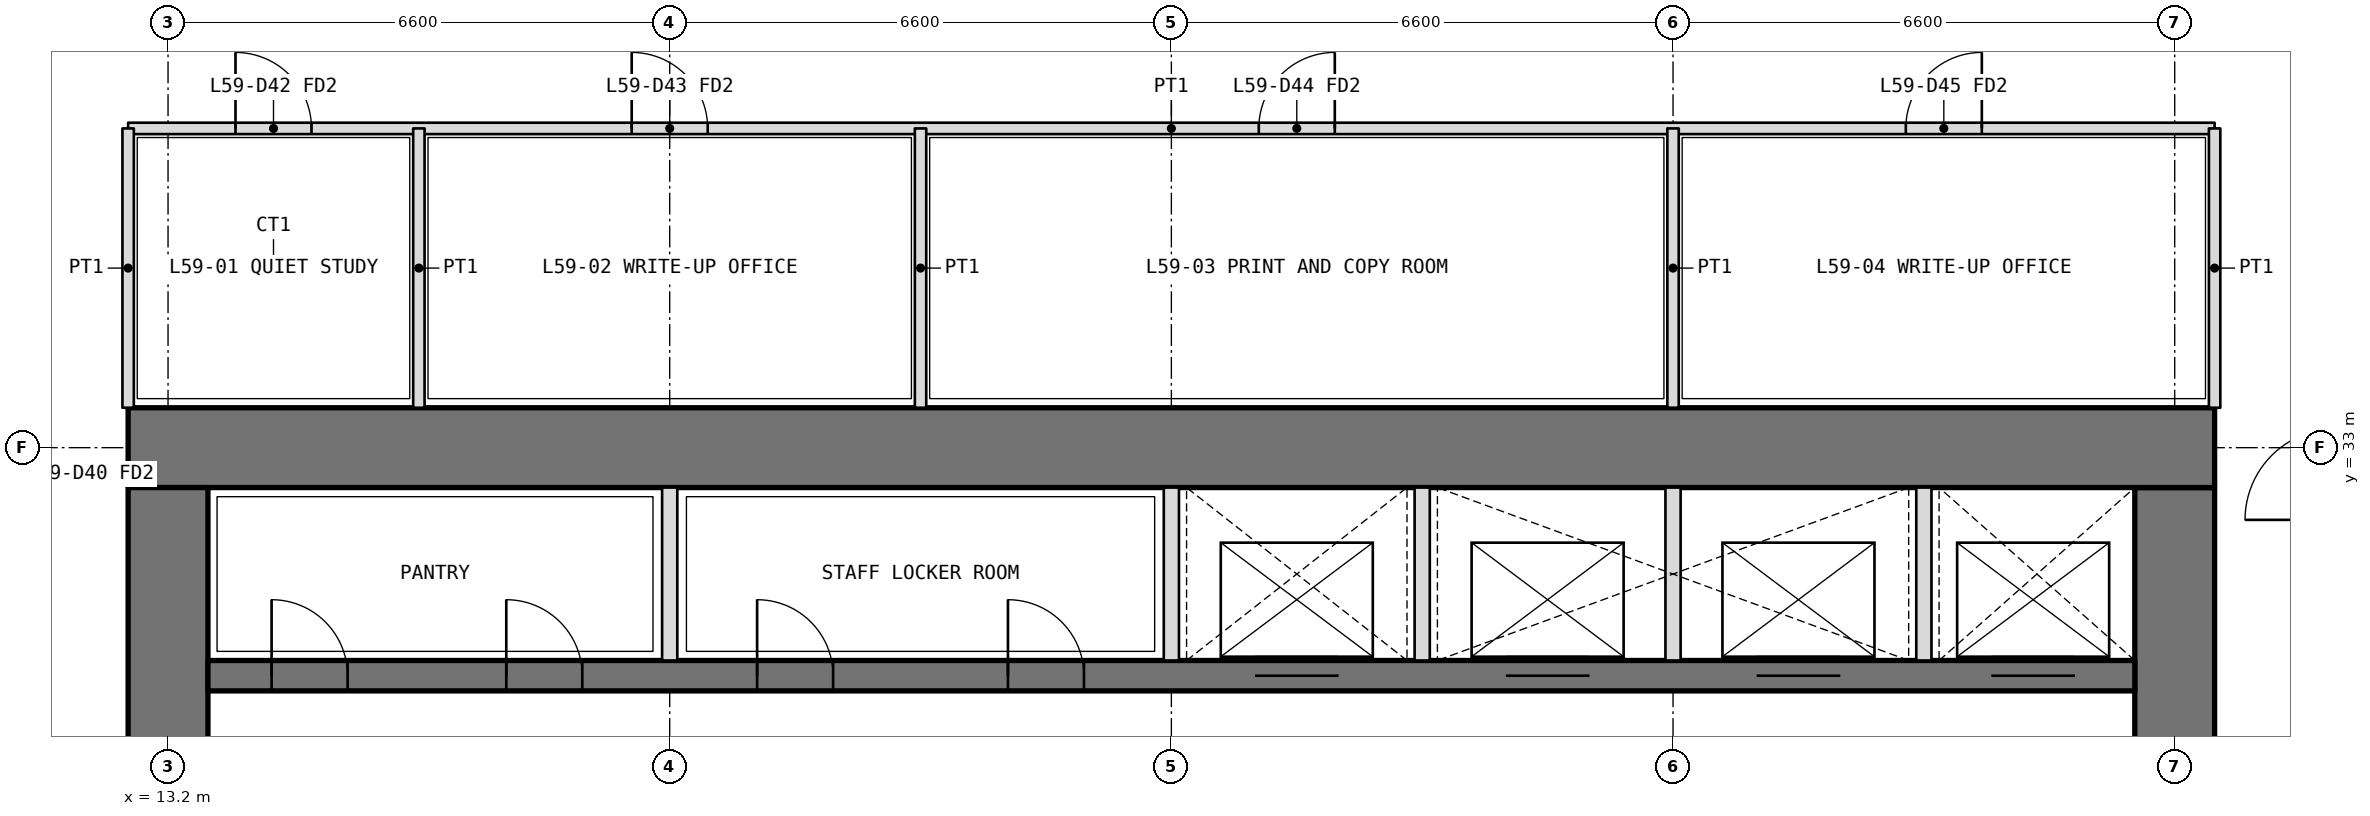
"""IFC4 building model, lengths in metres.
Left out: names, types, materials, properties, quantities, classifications, styles, units other than length and angle.
Written with IfcOpenShell. Run it as: python <this file> out.ifc"""

import sys

from ifc_helpers import new_model, si_unit, direction, frame, frame_2d, origin, place, context, subcontext, project, spatial, rectangle, extrude, element, fill, save


model = new_model("IFC4")
c1 = context("Model", 3, precision=1e-05, world=origin(), true_north=direction((0.0, 1.0)))
c2 = subcontext(c1, "Body", "Model", "MODEL_VIEW")
j1 = project(units=[si_unit("LENGTHUNIT", "METRE"), si_unit("PLANEANGLEUNIT", "RADIAN")], contexts=[c1])
p1 = place(None, origin())
s1 = spatial("IfcSite", under=j1, at=p1, CompositionType="ELEMENT")
p2 = place(p1, origin())
s2 = spatial("IfcBuilding", under=s1, at=p2, CompositionType="ELEMENT")
p3 = place(p2, frame((0.0, 0.0, 258.6)))
s3 = spatial("IfcBuildingStorey", under=s2, at=p3, CompositionType="ELEMENT", Elevation=258.6)
p4 = place(p3, frame((39.6, 13.725, 0.0), z_axis=(0.0, 0.0, 1.0), x_axis=(0.0, 1.0, 0.0)))
e1 = element("IfcWall", 1, at=p4, inside=s3, PredefinedType="SHEAR", context=c2, shape_type="SweptSolid", body=[
    extrude(rectangle(XDim=18.75, YDim=1.05, at=frame_2d((9.375, 0.0))), origin(), (0.0, 0.0, 1.0), 4.2),
])
p5 = place(p4, frame((3.025, 0.0, 0.0)))
e2 = element("IfcOpeningElement", 2, at=p5, cuts=e1, PredefinedType="OPENING", context=c2, shape_type="SweptSolid", body=[
    extrude(rectangle(XDim=1.6, YDim=2.1, at=frame_2d((0.8, 1.05))), frame((0.0, 0.535, 0.0), z_axis=(0.0, -1.0, 0.0), x_axis=(1.0, 0.0, 0.0)), (0.0, 0.0, 1.0), 1.07),
])
p6 = place(p4, frame((13.825, 0.0, 0.0)))
e3 = element("IfcOpeningElement", 3, at=p6, cuts=e1, PredefinedType="OPENING", context=c2, shape_type="SweptSolid", body=[
    extrude(rectangle(XDim=1.6, YDim=2.1, at=frame_2d((0.8, 1.05))), frame((0.0, 0.535, 0.0), z_axis=(0.0, -1.0, 0.0), x_axis=(1.0, 0.0, 0.0)), (0.0, 0.0, 1.0), 1.07),
])
p7 = place(p3, frame((40.125, 33.0, 0.0), z_axis=(0.0, 0.0, 1.0), x_axis=(-1.0, 0.0, 0.0)))
e4 = element("IfcWall", 4, at=p7, inside=s3, PredefinedType="SHEAR", context=c2, shape_type="SweptSolid", body=[
    extrude(rectangle(XDim=27.45, YDim=1.05, at=frame_2d((13.725, 0.0))), origin(), (0.0, 0.0, 1.0), 4.2),
])
p8 = place(p3, frame((13.2, 32.475, 0.0), z_axis=(0.0, 0.0, 1.0), x_axis=(0.0, -1.0, 0.0)))
e5 = element("IfcWall", 5, at=p8, inside=s3, PredefinedType="SHEAR", context=c2, shape_type="SweptSolid", body=[
    extrude(rectangle(XDim=18.75, YDim=1.05, at=frame_2d((9.375, 0.0))), origin(), (0.0, 0.0, 1.0), 4.2),
])
p9 = place(p8, frame((14.125, 0.0, 0.0)))
e6 = element("IfcOpeningElement", 6, at=p9, cuts=e5, PredefinedType="OPENING", context=c2, shape_type="SweptSolid", body=[
    extrude(rectangle(XDim=1.6, YDim=2.1, at=frame_2d((0.8, 1.05))), frame((0.0, 0.535, 0.0), z_axis=(0.0, -1.0, 0.0), x_axis=(1.0, 0.0, 0.0)), (0.0, 0.0, 1.0), 1.07),
])
p10 = place(p8, frame((3.325, 0.0, 0.0)))
e7 = element("IfcOpeningElement", 7, at=p10, cuts=e5, PredefinedType="OPENING", context=c2, shape_type="SweptSolid", body=[
    extrude(rectangle(XDim=1.6, YDim=2.1, at=frame_2d((0.8, 1.05))), frame((0.0, 0.535, 0.0), z_axis=(0.0, -1.0, 0.0), x_axis=(1.0, 0.0, 0.0)), (0.0, 0.0, 1.0), 1.07),
])
p11 = place(p3, frame((13.725, 30.0, 0.0), z_axis=(0.0, 0.0, 1.0), x_axis=(1.0, 0.0, 0.0)))
e8 = element("IfcWall", 8, at=p11, inside=s3, PredefinedType="SHEAR", context=c2, shape_type="SweptSolid", body=[
    extrude(rectangle(XDim=25.35, YDim=0.4, at=frame_2d((12.675, 0.0))), origin(), (0.0, 0.0, 1.0), 4.2),
])
p12 = place(p11, frame((0.837, 0.0, 0.0)))
e9 = element("IfcOpeningElement", 9, at=p12, cuts=e8, PredefinedType="OPENING", context=c2, shape_type="SweptSolid", body=[
    extrude(rectangle(XDim=1.0, YDim=2.1, at=frame_2d((0.5, 1.05))), frame((0.0, 0.21, 0.0), z_axis=(0.0, -1.0, 0.0), x_axis=(1.0, 0.0, 0.0)), (0.0, 0.0, 1.0), 0.42),
])
p13 = place(p11, frame((3.925, 0.0, 0.0)))
e10 = element("IfcOpeningElement", 10, at=p13, cuts=e8, PredefinedType="OPENING", context=c2, shape_type="SweptSolid", body=[
    extrude(rectangle(XDim=1.0, YDim=2.1, at=frame_2d((0.5, 1.05))), frame((0.0, 0.21, 0.0), z_axis=(0.0, -1.0, 0.0), x_axis=(1.0, 0.0, 0.0)), (0.0, 0.0, 1.0), 0.42),
])
p14 = place(p11, frame((7.225, 0.0, 0.0)))
e11 = element("IfcOpeningElement", 11, at=p14, cuts=e8, PredefinedType="OPENING", context=c2, shape_type="SweptSolid", body=[
    extrude(rectangle(XDim=1.0, YDim=2.1, at=frame_2d((0.5, 1.05))), frame((0.0, 0.21, 0.0), z_axis=(0.0, -1.0, 0.0), x_axis=(1.0, 0.0, 0.0)), (0.0, 0.0, 1.0), 0.42),
])
p15 = place(p11, frame((10.525, 0.0, 0.0)))
e12 = element("IfcOpeningElement", 12, at=p15, cuts=e8, PredefinedType="OPENING", context=c2, shape_type="SweptSolid", body=[
    extrude(rectangle(XDim=1.0, YDim=2.1, at=frame_2d((0.5, 1.05))), frame((0.0, 0.21, 0.0), z_axis=(0.0, -1.0, 0.0), x_axis=(1.0, 0.0, 0.0)), (0.0, 0.0, 1.0), 0.42),
])
p16 = place(p11, frame((13.775, 0.0, 0.0)))
e13 = element("IfcOpeningElement", 13, at=p16, cuts=e8, PredefinedType="OPENING", context=c2, shape_type="SweptSolid", body=[
    extrude(rectangle(XDim=1.1, YDim=2.1, at=frame_2d((0.55, 1.05))), frame((0.0, 0.21, 0.0), z_axis=(0.0, -1.0, 0.0), x_axis=(1.0, 0.0, 0.0)), (0.0, 0.0, 1.0), 0.42),
])
p17 = place(p11, frame((17.075, 0.0, 0.0)))
e14 = element("IfcOpeningElement", 14, at=p17, cuts=e8, PredefinedType="OPENING", context=c2, shape_type="SweptSolid", body=[
    extrude(rectangle(XDim=1.1, YDim=2.1, at=frame_2d((0.55, 1.05))), frame((0.0, 0.21, 0.0), z_axis=(0.0, -1.0, 0.0), x_axis=(1.0, 0.0, 0.0)), (0.0, 0.0, 1.0), 0.42),
])
p18 = place(p11, frame((20.375, 0.0, 0.0)))
e15 = element("IfcOpeningElement", 15, at=p18, cuts=e8, PredefinedType="OPENING", context=c2, shape_type="SweptSolid", body=[
    extrude(rectangle(XDim=1.1, YDim=2.1, at=frame_2d((0.55, 1.05))), frame((0.0, 0.21, 0.0), z_axis=(0.0, -1.0, 0.0), x_axis=(1.0, 0.0, 0.0)), (0.0, 0.0, 1.0), 0.42),
])
p19 = place(p11, frame((23.462, 0.0, 0.0)))
e16 = element("IfcOpeningElement", 16, at=p19, cuts=e8, PredefinedType="OPENING", context=c2, shape_type="SweptSolid", body=[
    extrude(rectangle(XDim=1.1, YDim=2.1, at=frame_2d((0.55, 1.05))), frame((0.0, 0.21, 0.0), z_axis=(0.0, -1.0, 0.0), x_axis=(1.0, 0.0, 0.0)), (0.0, 0.0, 1.0), 0.42),
])
for number, where, z_axis, x_axis in (
    (17, (19.8, 30.2, 0.0), (0.0, 0.0, 1.0), (0.0, 1.0, 0.0)),
    (18, (26.4, 30.2, 0.0), (0.0, 0.0, 1.0), (0.0, 1.0, 0.0)),
    (19, (29.7, 30.2, 0.0), (0.0, 0.0, 1.0), (0.0, 1.0, 0.0)),
    (20, (33.0, 30.2, 0.0), (0.0, 0.0, 1.0), (0.0, 1.0, 0.0)),
    (21, (36.3, 30.2, 0.0), (0.0, 0.0, 1.0), (0.0, 1.0, 0.0)),
):
    element("IfcWall", number, at=place(p3, frame(where, z_axis=z_axis, x_axis=x_axis)), inside=s3, PredefinedType="PARTITIONING", context=c2, shape_type="SweptSolid", body=[
        extrude(rectangle(XDim=2.275, YDim=0.2, at=frame_2d((1.138, 0.0))), origin(), (0.0, 0.0, 1.0), 4.2),
    ])
p20 = place(p3, frame((12.675, 37.2, 0.0), z_axis=(0.0, 0.0, 1.0), x_axis=(1.0, 0.0, 0.0)))
e22 = element("IfcWall", 22, at=p20, inside=s3, PredefinedType="PARTITIONING", context=c2, shape_type="SweptSolid", body=[
    extrude(rectangle(XDim=27.45, YDim=0.15, at=frame_2d((13.725, 0.0))), origin(), (0.0, 0.0, 1.0), 3.0),
])
p21 = place(p20, frame((1.413, 0.0, 0.0)))
e23 = element("IfcOpeningElement", 23, at=p21, cuts=e22, PredefinedType="OPENING", context=c2, shape_type="SweptSolid", body=[
    extrude(rectangle(XDim=1.0, YDim=2.1, at=frame_2d((0.5, 1.05))), frame((0.0, 0.085, 0.0), z_axis=(0.0, -1.0, 0.0), x_axis=(1.0, 0.0, 0.0)), (0.0, 0.0, 1.0), 0.17),
])
p22 = place(p20, frame((6.625, 0.0, 0.0)))
e24 = element("IfcOpeningElement", 24, at=p22, cuts=e22, PredefinedType="OPENING", context=c2, shape_type="SweptSolid", body=[
    extrude(rectangle(XDim=1.0, YDim=2.1, at=frame_2d((0.5, 1.05))), frame((0.0, 0.085, 0.0), z_axis=(0.0, -1.0, 0.0), x_axis=(1.0, 0.0, 0.0)), (0.0, 0.0, 1.0), 0.17),
])
p23 = place(p20, frame((14.875, 0.0, 0.0)))
e25 = element("IfcOpeningElement", 25, at=p23, cuts=e22, PredefinedType="OPENING", context=c2, shape_type="SweptSolid", body=[
    extrude(rectangle(XDim=1.0, YDim=2.1, at=frame_2d((0.5, 1.05))), frame((0.0, 0.085, 0.0), z_axis=(0.0, -1.0, 0.0), x_axis=(1.0, 0.0, 0.0)), (0.0, 0.0, 1.0), 0.17),
])
p24 = place(p20, frame((23.387, 0.0, 0.0)))
e26 = element("IfcOpeningElement", 26, at=p24, cuts=e22, PredefinedType="OPENING", context=c2, shape_type="SweptSolid", body=[
    extrude(rectangle(XDim=1.0, YDim=2.1, at=frame_2d((0.5, 1.05))), frame((0.0, 0.085, 0.0), z_axis=(0.0, -1.0, 0.0), x_axis=(1.0, 0.0, 0.0)), (0.0, 0.0, 1.0), 0.17),
])
for number, where, z_axis, x_axis in (
    (27, (12.675, 33.525, 0.0), (0.0, 0.0, 1.0), (0.0, 1.0, 0.0)),
    (28, (40.125, 33.525, 0.0), (0.0, 0.0, 1.0), (0.0, 1.0, 0.0)),
):
    element("IfcWall", number, at=place(p3, frame(where, z_axis=z_axis, x_axis=x_axis)), inside=s3, PredefinedType="PARTITIONING", context=c2, shape_type="SweptSolid", body=[
        extrude(rectangle(XDim=3.675, YDim=0.15, at=frame_2d((1.837, 0.0))), origin(), (0.0, 0.0, 1.0), 3.0),
    ])
for number, where, z_axis, x_axis in (
    (29, (16.5, 33.525, 0.0), (0.0, 0.0, 1.0), (0.0, 1.0, 0.0)),
    (30, (23.1, 33.525, 0.0), (0.0, 0.0, 1.0), (0.0, 1.0, 0.0)),
):
    element("IfcWall", number, at=place(p3, frame(where, z_axis=z_axis, x_axis=x_axis)), inside=s3, PredefinedType="PARTITIONING", context=c2, shape_type="SweptSolid", body=[
        extrude(rectangle(XDim=3.675, YDim=0.15, at=frame_2d((1.837, 0.0))), origin(), (0.0, 0.0, 1.0), 3.9),
    ])
p25 = place(p3, frame((33.0, 33.525, 0.0), z_axis=(0.0, 0.0, 1.0), x_axis=(0.0, 1.0, 0.0)))
e31 = element("IfcWall", 31, at=p25, inside=s3, PredefinedType="PARTITIONING", context=c2, shape_type="SweptSolid", body=[
    extrude(rectangle(XDim=3.675, YDim=0.15, at=frame_2d((1.837, 0.0))), origin(), (0.0, 0.0, 1.0), 3.0),
])
p26 = place(p21, origin())
e32 = element("IfcDoor", 32, at=p26, inside=s3, OperationType="SINGLE_SWING_LEFT", PredefinedType="DOOR", context=c2, shape_type="SweptSolid", body=[
    extrude(rectangle(XDim=1.0, YDim=2.1, at=frame_2d((0.5, 1.05))), frame((0.0, 0.025, 0.0), z_axis=(0.0, -1.0, 0.0), x_axis=(1.0, 0.0, 0.0)), (0.0, 0.0, 1.0), 0.05),
])
fill(e23, e32)
p27 = place(p22, origin())
e33 = element("IfcDoor", 33, at=p27, inside=s3, OperationType="SINGLE_SWING_LEFT", PredefinedType="DOOR", context=c2, shape_type="SweptSolid", body=[
    extrude(rectangle(XDim=1.0, YDim=2.1, at=frame_2d((0.5, 1.05))), frame((0.0, 0.025, 0.0), z_axis=(0.0, -1.0, 0.0), x_axis=(1.0, 0.0, 0.0)), (0.0, 0.0, 1.0), 0.05),
])
fill(e24, e33)
p28 = place(p23, origin())
e34 = element("IfcDoor", 34, at=p28, inside=s3, OperationType="SINGLE_SWING_RIGHT", PredefinedType="DOOR", context=c2, shape_type="SweptSolid", body=[
    extrude(rectangle(XDim=1.0, YDim=2.1, at=frame_2d((0.5, 1.05))), frame((0.0, 0.025, 0.0), z_axis=(0.0, -1.0, 0.0), x_axis=(1.0, 0.0, 0.0)), (0.0, 0.0, 1.0), 0.05),
])
fill(e25, e34)
p29 = place(p24, origin())
e35 = element("IfcDoor", 35, at=p29, inside=s3, OperationType="SINGLE_SWING_RIGHT", PredefinedType="DOOR", context=c2, shape_type="SweptSolid", body=[
    extrude(rectangle(XDim=1.0, YDim=2.1, at=frame_2d((0.5, 1.05))), frame((0.0, 0.025, 0.0), z_axis=(0.0, -1.0, 0.0), x_axis=(1.0, 0.0, 0.0)), (0.0, 0.0, 1.0), 0.05),
])
fill(e26, e35)
p30 = place(p12, origin())
e36 = element("IfcDoor", 36, at=p30, inside=s3, OperationType="SINGLE_SWING_LEFT", PredefinedType="DOOR", context=c2, shape_type="SweptSolid", body=[
    extrude(rectangle(XDim=1.0, YDim=2.1, at=frame_2d((0.5, 1.05))), frame((0.0, 0.025, 0.0), z_axis=(0.0, -1.0, 0.0), x_axis=(1.0, 0.0, 0.0)), (0.0, 0.0, 1.0), 0.05),
])
fill(e9, e36)
p31 = place(p13, origin())
e37 = element("IfcDoor", 37, at=p31, inside=s3, OperationType="SINGLE_SWING_LEFT", PredefinedType="DOOR", context=c2, shape_type="SweptSolid", body=[
    extrude(rectangle(XDim=1.0, YDim=2.1, at=frame_2d((0.5, 1.05))), frame((0.0, 0.025, 0.0), z_axis=(0.0, -1.0, 0.0), x_axis=(1.0, 0.0, 0.0)), (0.0, 0.0, 1.0), 0.05),
])
fill(e10, e37)
p32 = place(p14, origin())
e38 = element("IfcDoor", 38, at=p32, inside=s3, OperationType="SINGLE_SWING_LEFT", PredefinedType="DOOR", context=c2, shape_type="SweptSolid", body=[
    extrude(rectangle(XDim=1.0, YDim=2.1, at=frame_2d((0.5, 1.05))), frame((0.0, 0.025, 0.0), z_axis=(0.0, -1.0, 0.0), x_axis=(1.0, 0.0, 0.0)), (0.0, 0.0, 1.0), 0.05),
])
fill(e11, e38)
p33 = place(p15, origin())
e39 = element("IfcDoor", 39, at=p33, inside=s3, OperationType="SINGLE_SWING_LEFT", PredefinedType="DOOR", context=c2, shape_type="SweptSolid", body=[
    extrude(rectangle(XDim=1.0, YDim=2.1, at=frame_2d((0.5, 1.05))), frame((0.0, 0.025, 0.0), z_axis=(0.0, -1.0, 0.0), x_axis=(1.0, 0.0, 0.0)), (0.0, 0.0, 1.0), 0.05),
])
fill(e12, e39)
p34 = place(p16, origin())
e40 = element("IfcDoor", 40, at=p34, inside=s3, OperationType="DOUBLE_DOOR_SLIDING", PredefinedType="DOOR", context=c2, shape_type="SweptSolid", body=[
    extrude(rectangle(XDim=1.1, YDim=2.1, at=frame_2d((0.55, 1.05))), frame((0.0, 0.025, 0.0), z_axis=(0.0, -1.0, 0.0), x_axis=(1.0, 0.0, 0.0)), (0.0, 0.0, 1.0), 0.05),
])
fill(e13, e40)
p35 = place(p17, origin())
e41 = element("IfcDoor", 41, at=p35, inside=s3, OperationType="DOUBLE_DOOR_SLIDING", PredefinedType="DOOR", context=c2, shape_type="SweptSolid", body=[
    extrude(rectangle(XDim=1.1, YDim=2.1, at=frame_2d((0.55, 1.05))), frame((0.0, 0.025, 0.0), z_axis=(0.0, -1.0, 0.0), x_axis=(1.0, 0.0, 0.0)), (0.0, 0.0, 1.0), 0.05),
])
fill(e14, e41)
p36 = place(p18, origin())
e42 = element("IfcDoor", 42, at=p36, inside=s3, OperationType="DOUBLE_DOOR_SLIDING", PredefinedType="DOOR", context=c2, shape_type="SweptSolid", body=[
    extrude(rectangle(XDim=1.1, YDim=2.1, at=frame_2d((0.55, 1.05))), frame((0.0, 0.025, 0.0), z_axis=(0.0, -1.0, 0.0), x_axis=(1.0, 0.0, 0.0)), (0.0, 0.0, 1.0), 0.05),
])
fill(e15, e42)
p37 = place(p19, origin())
e43 = element("IfcDoor", 43, at=p37, inside=s3, OperationType="DOUBLE_DOOR_SLIDING", PredefinedType="DOOR", context=c2, shape_type="SweptSolid", body=[
    extrude(rectangle(XDim=1.1, YDim=2.1, at=frame_2d((0.55, 1.05))), frame((0.0, 0.025, 0.0), z_axis=(0.0, -1.0, 0.0), x_axis=(1.0, 0.0, 0.0)), (0.0, 0.0, 1.0), 0.05),
])
fill(e16, e43)
save(model, sys.argv[1])
